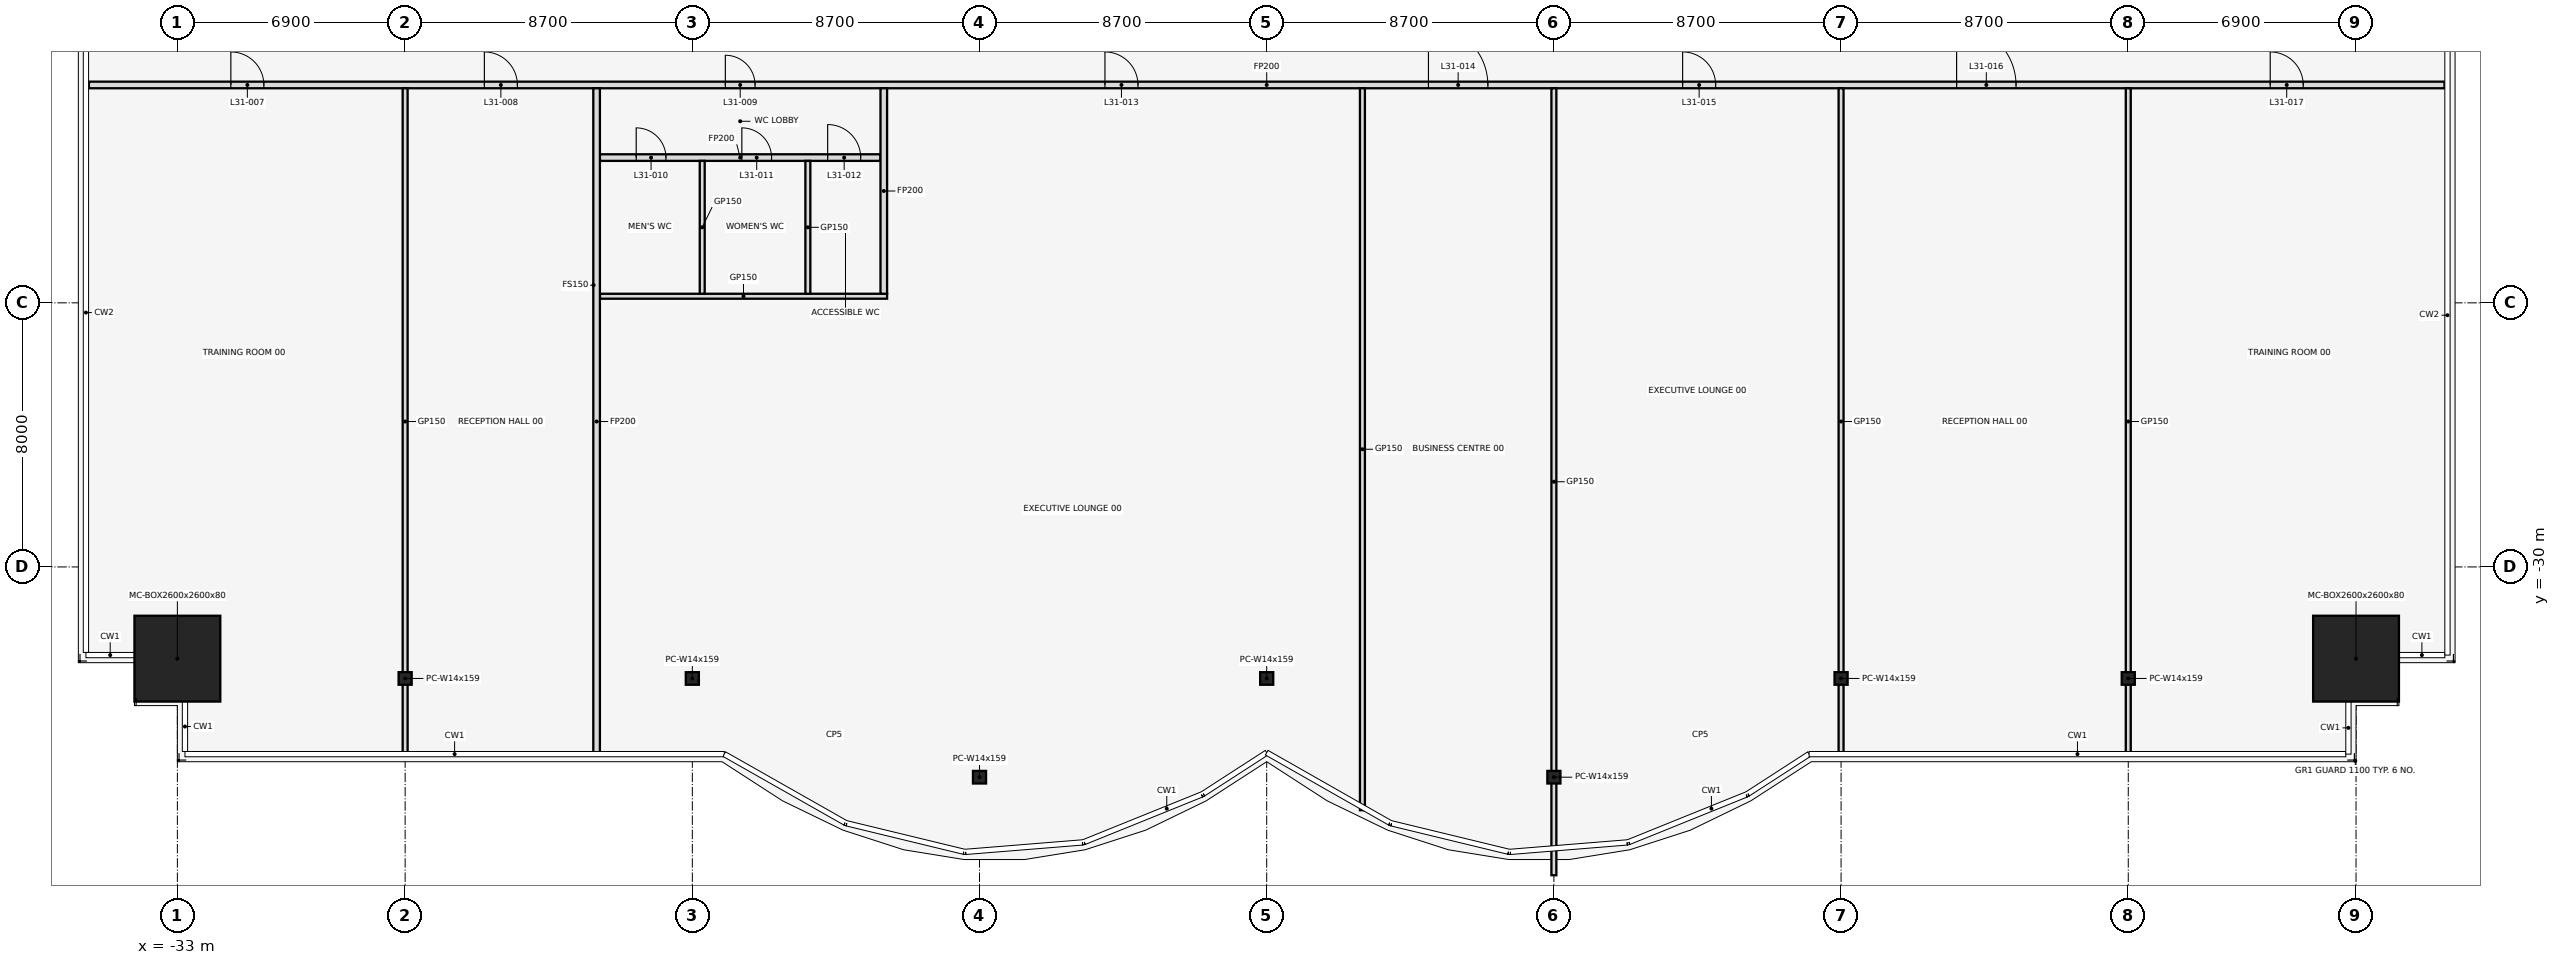
"""IFC4 building model, lengths in metres.
Left out: names, types, materials, properties, quantities, classifications, styles, units other than length and angle.
Written with IfcOpenShell. Run it as: python <this file> out.ifc"""

import sys

from ifc_helpers import new_model, si_unit, direction, frame, frame_2d, origin, origin_2d, place, context, subcontext, project, spatial, rectangle, hollow_rectangle, i_section, extrude, element, fill, save


model = new_model("IFC4")
c1 = context("Model", 3, precision=1e-05, world=origin(), true_north=direction((0.0, 1.0)))
c2 = subcontext(c1, "Body", "Model", "MODEL_VIEW")
j1 = project(units=[si_unit("LENGTHUNIT", "METRE"), si_unit("PLANEANGLEUNIT", "RADIAN")], contexts=[c1])
p1 = place(None, origin())
s1 = spatial("IfcSite", under=j1, at=p1, CompositionType="ELEMENT")
p2 = place(p1, origin())
s2 = spatial("IfcBuilding", under=s1, at=p2, CompositionType="ELEMENT")
p3 = place(p2, frame((0.0, 0.0, 144.5)))
s3 = spatial("IfcBuildingStorey", under=s2, at=p3, CompositionType="ELEMENT", Elevation=144.5)
p4 = place(p3, frame((-33.0, -32.778, 0.0), z_axis=(0.0, 0.0, 1.0), x_axis=(1.0, 0.0, 0.0)))
e1 = element("IfcColumn", 1, at=p4, inside=s3, PredefinedType="COLUMN", context=c2, shape_type="SweptSolid", body=[
    extrude(hollow_rectangle(XDim=2.6, YDim=2.6, WallThickness=0.08, at=origin_2d()), origin(), (0.0, 0.0, 1.0), 4.1),
])
for number, where, z_axis, x_axis in (
    (2, (-26.1, -33.378, 0.0), (0.0, 0.0, 1.0), (1.0, 0.0, 0.0)),
    (3, (-17.4, -33.378, 0.0), (0.0, 0.0, 1.0), (1.0, 0.0, 0.0)),
    (4, (-8.7, -36.369, 0.0), (0.0, 0.0, 1.0), (1.0, 0.0, 0.0)),
    (5, (0.0, -33.378, 0.0), (0.0, 0.0, 1.0), (1.0, 0.0, 0.0)),
    (6, (8.7, -36.369, 0.0), (0.0, 0.0, 1.0), (1.0, 0.0, 0.0)),
    (7, (17.4, -33.378, 0.0), (0.0, 0.0, 1.0), (1.0, 0.0, 0.0)),
    (8, (26.1, -33.378, 0.0), (0.0, 0.0, 1.0), (1.0, 0.0, 0.0)),
):
    element("IfcColumn", number, at=place(p3, frame(where, z_axis=z_axis, x_axis=x_axis)), inside=s3, PredefinedType="COLUMN", context=c2, shape_type="SweptSolid", body=[
        extrude(i_section(OverallWidth=0.396, OverallDepth=0.381, WebThickness=0.019, FlangeThickness=0.03, at=origin_2d()), origin(), (0.0, 0.0, 1.0), 4.1),
    ])
p5 = place(p3, frame((33.0, -32.778, 0.0), z_axis=(0.0, 0.0, 1.0), x_axis=(1.0, 0.0, 0.0)))
e9 = element("IfcColumn", 9, at=p5, inside=s3, PredefinedType="COLUMN", context=c2, shape_type="SweptSolid", body=[
    extrude(hollow_rectangle(XDim=2.6, YDim=2.6, WallThickness=0.08, at=origin_2d()), origin(), (0.0, 0.0, 1.0), 4.1),
])
p6 = place(p3, frame((-20.2, -21.8, 0.0), z_axis=(0.0, 0.0, 1.0), x_axis=(1.0, 0.0, 0.0)))
e10 = element("IfcWall", 10, at=p6, inside=s3, PredefinedType="PARTITIONING", context=c2, shape_type="SweptSolid", body=[
    extrude(rectangle(XDim=8.7, YDim=0.15, at=frame_2d((4.35, 0.0))), origin(), (0.0, 0.0, 1.0), 2.84),
])
p7 = place(p3, frame((-20.2, -17.6, 0.0), z_axis=(0.0, 0.0, 1.0), x_axis=(1.0, 0.0, 0.0)))
e11 = element("IfcWall", 11, at=p7, inside=s3, PredefinedType="PARTITIONING", context=c2, shape_type="SweptSolid", body=[
    extrude(rectangle(XDim=8.5, YDim=0.2, at=frame_2d((4.25, 0.0))), origin(), (0.0, 0.0, 1.0), 2.84),
])
p8 = place(p7, frame((1.1, 0.0, 0.0)))
e12 = element("IfcOpeningElement", 12, at=p8, cuts=e11, PredefinedType="OPENING", context=c2, shape_type="SweptSolid", body=[
    extrude(rectangle(XDim=0.9, YDim=2.1, at=frame_2d((0.45, 1.05))), frame((0.0, 0.112, 0.0), z_axis=(0.0, -1.0, 0.0), x_axis=(1.0, 0.0, 0.0)), (0.0, 0.0, 1.0), 0.224),
])
p9 = place(p7, frame((4.3, 0.0, 0.0)))
e13 = element("IfcOpeningElement", 13, at=p9, cuts=e11, PredefinedType="OPENING", context=c2, shape_type="SweptSolid", body=[
    extrude(rectangle(XDim=0.9, YDim=2.1, at=frame_2d((0.45, 1.05))), frame((0.0, 0.112, 0.0), z_axis=(0.0, -1.0, 0.0), x_axis=(1.0, 0.0, 0.0)), (0.0, 0.0, 1.0), 0.224),
])
p10 = place(p7, frame((6.9, 0.0, 0.0)))
e14 = element("IfcOpeningElement", 14, at=p10, cuts=e11, PredefinedType="OPENING", context=c2, shape_type="SweptSolid", body=[
    extrude(rectangle(XDim=1.0, YDim=2.1, at=frame_2d((0.5, 1.05))), frame((0.0, 0.112, 0.0), z_axis=(0.0, -1.0, 0.0), x_axis=(1.0, 0.0, 0.0)), (0.0, 0.0, 1.0), 0.224),
])
p11 = place(p3, frame((-35.68, -15.4, 0.0), z_axis=(0.0, 0.0, 1.0), x_axis=(1.0, 0.0, 0.0)))
e15 = element("IfcWall", 15, at=p11, inside=s3, PredefinedType="PARTITIONING", context=c2, shape_type="SweptSolid", body=[
    extrude(rectangle(XDim=71.36, YDim=0.2, at=frame_2d((35.68, 0.0))), origin(), (0.0, 0.0, 1.0), 2.84),
])
p12 = place(p11, frame((4.3, 0.0, 0.0)))
e16 = element("IfcOpeningElement", 16, at=p12, cuts=e15, PredefinedType="OPENING", context=c2, shape_type="SweptSolid", body=[
    extrude(rectangle(XDim=1.0, YDim=2.1, at=frame_2d((0.5, 1.05))), frame((0.0, 0.112, 0.0), z_axis=(0.0, -1.0, 0.0), x_axis=(1.0, 0.0, 0.0)), (0.0, 0.0, 1.0), 0.224),
])
p13 = place(p11, frame((11.98, 0.0, 0.0)))
e17 = element("IfcOpeningElement", 17, at=p13, cuts=e15, PredefinedType="OPENING", context=c2, shape_type="SweptSolid", body=[
    extrude(rectangle(XDim=1.0, YDim=2.1, at=frame_2d((0.5, 1.05))), frame((0.0, 0.112, 0.0), z_axis=(0.0, -1.0, 0.0), x_axis=(1.0, 0.0, 0.0)), (0.0, 0.0, 1.0), 0.224),
])
p14 = place(p11, frame((19.28, 0.0, 0.0)))
e18 = element("IfcOpeningElement", 18, at=p14, cuts=e15, PredefinedType="OPENING", context=c2, shape_type="SweptSolid", body=[
    extrude(rectangle(XDim=0.9, YDim=2.1, at=frame_2d((0.45, 1.05))), frame((0.0, 0.112, 0.0), z_axis=(0.0, -1.0, 0.0), x_axis=(1.0, 0.0, 0.0)), (0.0, 0.0, 1.0), 0.224),
])
p15 = place(p11, frame((30.78, 0.0, 0.0)))
e19 = element("IfcOpeningElement", 19, at=p15, cuts=e15, PredefinedType="OPENING", context=c2, shape_type="SweptSolid", body=[
    extrude(rectangle(XDim=1.0, YDim=2.1, at=frame_2d((0.5, 1.05))), frame((0.0, 0.112, 0.0), z_axis=(0.0, -1.0, 0.0), x_axis=(1.0, 0.0, 0.0)), (0.0, 0.0, 1.0), 0.224),
])
p16 = place(p11, frame((40.58, 0.0, 0.0)))
e20 = element("IfcOpeningElement", 20, at=p16, cuts=e15, PredefinedType="OPENING", context=c2, shape_type="SweptSolid", body=[
    extrude(rectangle(XDim=1.8, YDim=2.1, at=frame_2d((0.9, 1.05))), frame((0.0, 0.112, 0.0), z_axis=(0.0, -1.0, 0.0), x_axis=(1.0, 0.0, 0.0)), (0.0, 0.0, 1.0), 0.224),
])
p17 = place(p11, frame((48.28, 0.0, 0.0)))
e21 = element("IfcOpeningElement", 21, at=p17, cuts=e15, PredefinedType="OPENING", context=c2, shape_type="SweptSolid", body=[
    extrude(rectangle(XDim=1.0, YDim=2.1, at=frame_2d((0.5, 1.05))), frame((0.0, 0.112, 0.0), z_axis=(0.0, -1.0, 0.0), x_axis=(1.0, 0.0, 0.0)), (0.0, 0.0, 1.0), 0.224),
])
p18 = place(p11, frame((56.58, 0.0, 0.0)))
e22 = element("IfcOpeningElement", 22, at=p18, cuts=e15, PredefinedType="OPENING", context=c2, shape_type="SweptSolid", body=[
    extrude(rectangle(XDim=1.8, YDim=2.1, at=frame_2d((0.9, 1.05))), frame((0.0, 0.112, 0.0), z_axis=(0.0, -1.0, 0.0), x_axis=(1.0, 0.0, 0.0)), (0.0, 0.0, 1.0), 0.224),
])
p19 = place(p11, frame((66.08, 0.0, 0.0)))
e23 = element("IfcOpeningElement", 23, at=p19, cuts=e15, PredefinedType="OPENING", context=c2, shape_type="SweptSolid", body=[
    extrude(rectangle(XDim=1.0, YDim=2.1, at=frame_2d((0.5, 1.05))), frame((0.0, 0.112, 0.0), z_axis=(0.0, -1.0, 0.0), x_axis=(1.0, 0.0, 0.0)), (0.0, 0.0, 1.0), 0.224),
])
p20 = place(p3, frame((-26.1, -35.69, 0.0), z_axis=(0.0, 0.0, 1.0), x_axis=(0.0, 1.0, 0.0)))
e24 = element("IfcWall", 24, at=p20, inside=s3, PredefinedType="PARTITIONING", context=c2, shape_type="SweptSolid", body=[
    extrude(rectangle(XDim=20.19, YDim=0.15, at=frame_2d((10.095, 0.0))), origin(), (0.0, 0.0, 1.0), 2.84),
])
p21 = place(p3, frame((-20.3, -35.69, 0.0), z_axis=(0.0, 0.0, 1.0), x_axis=(0.0, 1.0, 0.0)))
e25 = element("IfcWall", 25, at=p21, inside=s3, PredefinedType="PARTITIONING", context=c2, shape_type="SweptSolid", body=[
    extrude(rectangle(XDim=20.19, YDim=0.2, at=frame_2d((10.095, 0.0))), origin(), (0.0, 0.0, 1.0), 2.84),
])
for number, where, z_axis, x_axis in (
    (26, (-17.1, -21.725, 0.0), (0.0, 0.0, 1.0), (0.0, 1.0, 0.0)),
    (27, (-13.9, -21.725, 0.0), (0.0, 0.0, 1.0), (0.0, 1.0, 0.0)),
):
    element("IfcWall", number, at=place(p3, frame(where, z_axis=z_axis, x_axis=x_axis)), inside=s3, PredefinedType="PARTITIONING", context=c2, shape_type="SweptSolid", body=[
        extrude(rectangle(XDim=4.025, YDim=0.15, at=frame_2d((2.013, 0.0))), origin(), (0.0, 0.0, 1.0), 2.84),
    ])
p22 = place(p3, frame((-11.6, -21.725, 0.0), z_axis=(0.0, 0.0, 1.0), x_axis=(0.0, 1.0, 0.0)))
e28 = element("IfcWall", 28, at=p22, inside=s3, PredefinedType="PARTITIONING", context=c2, shape_type="SweptSolid", body=[
    extrude(rectangle(XDim=6.225, YDim=0.2, at=frame_2d((3.113, 0.0))), origin(), (0.0, 0.0, 1.0), 2.84),
])
p23 = place(p3, frame((2.9, -37.37, 0.0), z_axis=(0.0, 0.0, 1.0), x_axis=(0.0, 1.0, 0.0)))
e29 = element("IfcWall", 29, at=p23, inside=s3, PredefinedType="PARTITIONING", context=c2, shape_type="SweptSolid", body=[
    extrude(rectangle(XDim=21.87, YDim=0.15, at=frame_2d((10.935, 0.0))), origin(), (0.0, 0.0, 1.0), 2.84),
])
p24 = place(p3, frame((8.7, -39.338, 0.0), z_axis=(0.0, 0.0, 1.0), x_axis=(0.0, 1.0, 0.0)))
e30 = element("IfcWall", 30, at=p24, inside=s3, PredefinedType="PARTITIONING", context=c2, shape_type="SweptSolid", body=[
    extrude(rectangle(XDim=23.838, YDim=0.15, at=frame_2d((11.919, 0.0))), origin(), (0.0, 0.0, 1.0), 2.84),
])
for number, where, z_axis, x_axis in (
    (31, (17.4, -35.69, 0.0), (0.0, 0.0, 1.0), (0.0, 1.0, 0.0)),
    (32, (26.1, -35.69, 0.0), (0.0, 0.0, 1.0), (0.0, 1.0, 0.0)),
):
    element("IfcWall", number, at=place(p3, frame(where, z_axis=z_axis, x_axis=x_axis)), inside=s3, PredefinedType="PARTITIONING", context=c2, shape_type="SweptSolid", body=[
        extrude(rectangle(XDim=20.19, YDim=0.15, at=frame_2d((10.095, 0.0))), origin(), (0.0, 0.0, 1.0), 2.84),
    ])
p25 = place(p12, frame((1.0, 0.0, 0.0), z_axis=(0.0, 0.0, 1.0), x_axis=(-1.0, 0.0, 0.0)))
e33 = element("IfcDoor", 33, at=p25, inside=s3, OperationType="SINGLE_SWING_LEFT", PredefinedType="DOOR", context=c2, shape_type="SweptSolid", body=[
    extrude(rectangle(XDim=1.0, YDim=2.1, at=frame_2d((0.5, 1.05))), frame((0.0, 0.025, 0.0), z_axis=(0.0, -1.0, 0.0), x_axis=(1.0, 0.0, 0.0)), (0.0, 0.0, 1.0), 0.05),
])
fill(e16, e33)
p26 = place(p13, frame((1.0, 0.0, 0.0), z_axis=(0.0, 0.0, 1.0), x_axis=(-1.0, 0.0, 0.0)))
e34 = element("IfcDoor", 34, at=p26, inside=s3, OperationType="SINGLE_SWING_RIGHT", PredefinedType="DOOR", context=c2, shape_type="SweptSolid", body=[
    extrude(rectangle(XDim=1.0, YDim=2.1, at=frame_2d((0.5, 1.05))), frame((0.0, 0.025, 0.0), z_axis=(0.0, -1.0, 0.0), x_axis=(1.0, 0.0, 0.0)), (0.0, 0.0, 1.0), 0.05),
])
fill(e17, e34)
p27 = place(p14, frame((0.9, 0.0, 0.0), z_axis=(0.0, 0.0, 1.0), x_axis=(-1.0, 0.0, 0.0)))
e35 = element("IfcDoor", 35, at=p27, inside=s3, OperationType="SINGLE_SWING_RIGHT", PredefinedType="DOOR", context=c2, shape_type="SweptSolid", body=[
    extrude(rectangle(XDim=0.9, YDim=2.1, at=frame_2d((0.45, 1.05))), frame((0.0, 0.025, 0.0), z_axis=(0.0, -1.0, 0.0), x_axis=(1.0, 0.0, 0.0)), (0.0, 0.0, 1.0), 0.05),
])
fill(e18, e35)
p28 = place(p8, frame((0.9, 0.0, 0.0), z_axis=(0.0, 0.0, 1.0), x_axis=(-1.0, 0.0, 0.0)))
e36 = element("IfcDoor", 36, at=p28, inside=s3, OperationType="SINGLE_SWING_LEFT", PredefinedType="DOOR", context=c2, shape_type="SweptSolid", body=[
    extrude(rectangle(XDim=0.9, YDim=2.1, at=frame_2d((0.45, 1.05))), frame((0.0, 0.025, 0.0), z_axis=(0.0, -1.0, 0.0), x_axis=(1.0, 0.0, 0.0)), (0.0, 0.0, 1.0), 0.05),
])
fill(e12, e36)
p29 = place(p9, frame((0.9, 0.0, 0.0), z_axis=(0.0, 0.0, 1.0), x_axis=(-1.0, 0.0, 0.0)))
e37 = element("IfcDoor", 37, at=p29, inside=s3, OperationType="SINGLE_SWING_RIGHT", PredefinedType="DOOR", context=c2, shape_type="SweptSolid", body=[
    extrude(rectangle(XDim=0.9, YDim=2.1, at=frame_2d((0.45, 1.05))), frame((0.0, 0.025, 0.0), z_axis=(0.0, -1.0, 0.0), x_axis=(1.0, 0.0, 0.0)), (0.0, 0.0, 1.0), 0.05),
])
fill(e13, e37)
p30 = place(p10, frame((1.0, 0.0, 0.0), z_axis=(0.0, 0.0, 1.0), x_axis=(-1.0, 0.0, 0.0)))
e38 = element("IfcDoor", 38, at=p30, inside=s3, OperationType="SINGLE_SWING_RIGHT", PredefinedType="DOOR", context=c2, shape_type="SweptSolid", body=[
    extrude(rectangle(XDim=1.0, YDim=2.1, at=frame_2d((0.5, 1.05))), frame((0.0, 0.025, 0.0), z_axis=(0.0, -1.0, 0.0), x_axis=(1.0, 0.0, 0.0)), (0.0, 0.0, 1.0), 0.05),
])
fill(e14, e38)
p31 = place(p15, frame((1.0, 0.0, 0.0), z_axis=(0.0, 0.0, 1.0), x_axis=(-1.0, 0.0, 0.0)))
e39 = element("IfcDoor", 39, at=p31, inside=s3, OperationType="SINGLE_SWING_LEFT", PredefinedType="DOOR", context=c2, shape_type="SweptSolid", body=[
    extrude(rectangle(XDim=1.0, YDim=2.1, at=frame_2d((0.5, 1.05))), frame((0.0, 0.025, 0.0), z_axis=(0.0, -1.0, 0.0), x_axis=(1.0, 0.0, 0.0)), (0.0, 0.0, 1.0), 0.05),
])
fill(e19, e39)
p32 = place(p16, origin())
e40 = element("IfcDoor", 40, at=p32, inside=s3, OperationType="SINGLE_SWING_LEFT", PredefinedType="DOOR", context=c2, shape_type="SweptSolid", body=[
    extrude(rectangle(XDim=1.8, YDim=2.1, at=frame_2d((0.9, 1.05))), frame((0.0, 0.025, 0.0), z_axis=(0.0, -1.0, 0.0), x_axis=(1.0, 0.0, 0.0)), (0.0, 0.0, 1.0), 0.05),
])
fill(e20, e40)
p33 = place(p17, frame((1.0, 0.0, 0.0), z_axis=(0.0, 0.0, 1.0), x_axis=(-1.0, 0.0, 0.0)))
e41 = element("IfcDoor", 41, at=p33, inside=s3, OperationType="SINGLE_SWING_RIGHT", PredefinedType="DOOR", context=c2, shape_type="SweptSolid", body=[
    extrude(rectangle(XDim=1.0, YDim=2.1, at=frame_2d((0.5, 1.05))), frame((0.0, 0.025, 0.0), z_axis=(0.0, -1.0, 0.0), x_axis=(1.0, 0.0, 0.0)), (0.0, 0.0, 1.0), 0.05),
])
fill(e21, e41)
p34 = place(p18, origin())
e42 = element("IfcDoor", 42, at=p34, inside=s3, OperationType="SINGLE_SWING_LEFT", PredefinedType="DOOR", context=c2, shape_type="SweptSolid", body=[
    extrude(rectangle(XDim=1.8, YDim=2.1, at=frame_2d((0.9, 1.05))), frame((0.0, 0.025, 0.0), z_axis=(0.0, -1.0, 0.0), x_axis=(1.0, 0.0, 0.0)), (0.0, 0.0, 1.0), 0.05),
])
fill(e22, e42)
p35 = place(p19, frame((1.0, 0.0, 0.0), z_axis=(0.0, 0.0, 1.0), x_axis=(-1.0, 0.0, 0.0)))
e43 = element("IfcDoor", 43, at=p35, inside=s3, OperationType="SINGLE_SWING_RIGHT", PredefinedType="DOOR", context=c2, shape_type="SweptSolid", body=[
    extrude(rectangle(XDim=1.0, YDim=2.1, at=frame_2d((0.5, 1.05))), frame((0.0, 0.025, 0.0), z_axis=(0.0, -1.0, 0.0), x_axis=(1.0, 0.0, 0.0)), (0.0, 0.0, 1.0), 0.05),
])
fill(e23, e43)
save(model, sys.argv[1])
